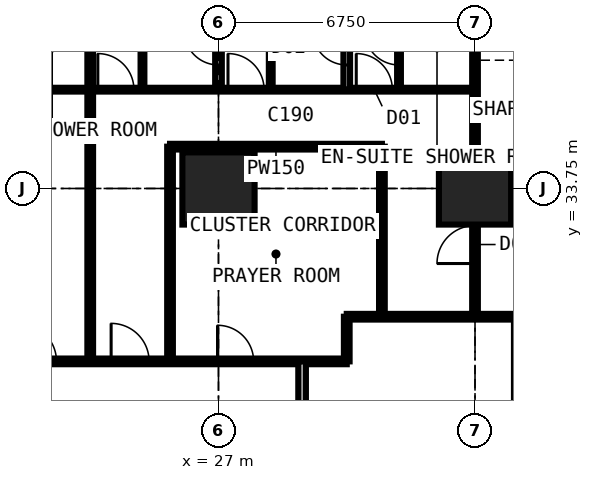
"""IFC4 building model, lengths in metres.
Left out: names, types, materials, properties, quantities, classifications, styles, units other than length and angle.
Written with IfcOpenShell. Run it as: python <this file> out.ifc"""

import sys

from ifc_helpers import new_model, si_unit, direction, frame, frame_2d, origin, origin_2d, place, context, subcontext, project, spatial, rectangle, extrude, element, fill, save


model = new_model("IFC4")
c1 = context("Model", 3, precision=1e-05, world=origin(), true_north=direction((0.0, 1.0)))
c2 = subcontext(c1, "Body", "Model", "MODEL_VIEW")
j1 = project(units=[si_unit("LENGTHUNIT", "METRE"), si_unit("PLANEANGLEUNIT", "RADIAN")], contexts=[c1])
p1 = place(None, origin())
s1 = spatial("IfcSite", under=j1, at=p1, CompositionType="ELEMENT")
p2 = place(p1, origin())
s2 = spatial("IfcBuilding", under=s1, at=p2, CompositionType="ELEMENT")
p3 = place(p2, frame((0.0, 0.0, 32.4)))
s3 = spatial("IfcBuildingStorey", under=s2, at=p3, CompositionType="ELEMENT", Elevation=32.4)
for number, where, z_axis, x_axis in (
    (1, (27.0, 33.75, 0.0), (0.0, 0.0, 1.0), (1.0, 0.0, 0.0)),
    (2, (33.75, 33.75, 0.0), (0.0, 0.0, 1.0), (1.0, 0.0, 0.0)),
):
    element("IfcColumn", number, at=place(p3, frame(where, z_axis=z_axis, x_axis=x_axis)), inside=s3, PredefinedType="COLUMN", context=c2, shape_type="SweptSolid", body=[
        extrude(rectangle(XDim=1.9, YDim=1.9, at=origin_2d()), origin(), (0.0, 0.0, 1.0), 3.6),
    ])
p4 = place(p3, frame((10.125, 36.35, 0.0), z_axis=(0.0, 0.0, 1.0), x_axis=(1.0, 0.0, 0.0)))
e3 = element("IfcWall", 3, at=p4, inside=s3, PredefinedType="PARTITIONING", context=c2, shape_type="SweptSolid", body=[
    extrude(rectangle(XDim=23.625, YDim=0.1, at=frame_2d((11.812, 0.0))), origin(), (0.0, 0.0, 1.0), 3.375),
])
p5 = place(p4, frame((20.5, 0.0, 0.0)))
e4 = element("IfcOpeningElement", 4, at=p5, cuts=e3, PredefinedType="OPENING", context=c2, shape_type="SweptSolid", body=[
    extrude(rectangle(XDim=0.95, YDim=2.2, at=frame_2d((0.475, 1.1))), frame((0.0, 0.06, 0.0), z_axis=(0.0, -1.0, 0.0), x_axis=(1.0, 0.0, 0.0)), (0.0, 0.0, 1.0), 0.12),
])
p6 = place(p4, frame((17.125, 0.0, 0.0)))
e5 = element("IfcOpeningElement", 5, at=p6, cuts=e3, PredefinedType="OPENING", context=c2, shape_type="SweptSolid", body=[
    extrude(rectangle(XDim=0.95, YDim=2.2, at=frame_2d((0.475, 1.1))), frame((0.0, 0.06, 0.0), z_axis=(0.0, -1.0, 0.0), x_axis=(1.0, 0.0, 0.0)), (0.0, 0.0, 1.0), 0.12),
])
p7 = place(p4, frame((13.7, 0.0, 0.0)))
e6 = element("IfcOpeningElement", 6, at=p7, cuts=e3, PredefinedType="OPENING", context=c2, shape_type="SweptSolid", body=[
    extrude(rectangle(XDim=0.95, YDim=2.2, at=frame_2d((0.475, 1.1))), frame((0.0, 0.06, 0.0), z_axis=(0.0, -1.0, 0.0), x_axis=(1.0, 0.0, 0.0)), (0.0, 0.0, 1.0), 0.12),
])
p8 = place(p4, frame((0.2, 0.0, 0.0)))
e7 = element("IfcOpeningElement", 7, at=p8, cuts=e3, PredefinedType="OPENING", context=c2, shape_type="SweptSolid", body=[
    extrude(rectangle(XDim=0.95, YDim=2.2, at=frame_2d((0.475, 1.1))), frame((0.0, 0.06, 0.0), z_axis=(0.0, -1.0, 0.0), x_axis=(1.0, 0.0, 0.0)), (0.0, 0.0, 1.0), 0.12),
])
p9 = place(p4, frame((3.625, 0.0, 0.0)))
e8 = element("IfcOpeningElement", 8, at=p9, cuts=e3, PredefinedType="OPENING", context=c2, shape_type="SweptSolid", body=[
    extrude(rectangle(XDim=0.95, YDim=2.2, at=frame_2d((0.475, 1.1))), frame((0.0, 0.06, 0.0), z_axis=(0.0, -1.0, 0.0), x_axis=(1.0, 0.0, 0.0)), (0.0, 0.0, 1.0), 0.12),
])
p10 = place(p4, frame((7.0, 0.0, 0.0)))
e9 = element("IfcOpeningElement", 9, at=p10, cuts=e3, PredefinedType="OPENING", context=c2, shape_type="SweptSolid", body=[
    extrude(rectangle(XDim=0.95, YDim=2.2, at=frame_2d((0.475, 1.1))), frame((0.0, 0.06, 0.0), z_axis=(0.0, -1.0, 0.0), x_axis=(1.0, 0.0, 0.0)), (0.0, 0.0, 1.0), 0.12),
])
p11 = place(p4, frame((10.375, 0.0, 0.0)))
e10 = element("IfcOpeningElement", 10, at=p11, cuts=e3, PredefinedType="OPENING", context=c2, shape_type="SweptSolid", body=[
    extrude(rectangle(XDim=0.95, YDim=2.2, at=frame_2d((0.475, 1.1))), frame((0.0, 0.06, 0.0), z_axis=(0.0, -1.0, 0.0), x_axis=(1.0, 0.0, 0.0)), (0.0, 0.0, 1.0), 0.12),
])
p12 = place(p3, frame((11.3, 29.2, 0.0), z_axis=(0.0, 0.0, 1.0), x_axis=(1.0, 0.0, 0.0)))
e11 = element("IfcWall", 11, at=p12, inside=s3, PredefinedType="PARTITIONING", context=c2, shape_type="SweptSolid", body=[
    extrude(rectangle(XDim=19.075, YDim=0.15, at=frame_2d((9.538, 0.0))), origin(), (0.0, 0.0, 1.0), 3.375),
])
p13 = place(p12, frame((12.875, 0.0, 0.0)))
e12 = element("IfcOpeningElement", 12, at=p13, cuts=e11, PredefinedType="OPENING", context=c2, shape_type="SweptSolid", body=[
    extrude(rectangle(XDim=1.0, YDim=2.2, at=frame_2d((0.5, 1.1))), frame((0.0, 0.085, 0.0), z_axis=(0.0, -1.0, 0.0), x_axis=(1.0, 0.0, 0.0)), (0.0, 0.0, 1.0), 0.17),
])
p14 = place(p12, frame((10.438, 0.0, 0.0)))
e13 = element("IfcOpeningElement", 13, at=p14, cuts=e11, PredefinedType="OPENING", context=c2, shape_type="SweptSolid", body=[
    extrude(rectangle(XDim=1.0, YDim=2.2, at=frame_2d((0.5, 1.1))), frame((0.0, 0.085, 0.0), z_axis=(0.0, -1.0, 0.0), x_axis=(1.0, 0.0, 0.0)), (0.0, 0.0, 1.0), 0.17),
])
p15 = place(p12, frame((15.675, 0.0, 0.0)))
e14 = element("IfcOpeningElement", 14, at=p15, cuts=e11, PredefinedType="OPENING", context=c2, shape_type="SweptSolid", body=[
    extrude(rectangle(XDim=0.95, YDim=2.2, at=frame_2d((0.475, 1.1))), frame((0.0, 0.085, 0.0), z_axis=(0.0, -1.0, 0.0), x_axis=(1.0, 0.0, 0.0)), (0.0, 0.0, 1.0), 0.17),
])
p16 = place(p3, frame((23.625, 29.2, 0.0), z_axis=(0.0, 0.0, 1.0), x_axis=(0.0, 1.0, 0.0)))
e15 = element("IfcWall", 15, at=p16, inside=s3, PredefinedType="PARTITIONING", context=c2, shape_type="SweptSolid", body=[
    extrude(rectangle(XDim=12.034, YDim=0.15, at=frame_2d((6.017, 0.0))), origin(), (0.0, 0.0, 1.0), 3.375),
])
p17 = place(p3, frame((25.0, 36.35, 0.0), z_axis=(0.0, 0.0, 1.0), x_axis=(0.0, 1.0, 0.0)))
e16 = element("IfcWall", 16, at=p17, inside=s3, PredefinedType="PARTITIONING", context=c2, shape_type="SweptSolid", body=[
    extrude(rectangle(XDim=2.2, YDim=0.1, at=frame_2d((1.1, 0.0))), origin(), (0.0, 0.0, 1.0), 3.375),
])
p18 = place(p3, frame((25.725, 29.2, 0.0), z_axis=(0.0, 0.0, 1.0), x_axis=(0.0, 1.0, 0.0)))
e17 = element("IfcWall", 17, at=p18, inside=s3, PredefinedType="PARTITIONING", context=c2, shape_type="SweptSolid", body=[
    extrude(rectangle(XDim=5.65, YDim=0.15, at=frame_2d((2.825, 0.0))), origin(), (0.0, 0.0, 1.0), 3.375),
])
p19 = place(p3, frame((25.725, 34.85, 0.0), z_axis=(0.0, 0.0, 1.0), x_axis=(1.0, 0.0, 0.0)))
e18 = element("IfcWall", 18, at=p19, inside=s3, PredefinedType="PARTITIONING", context=c2, shape_type="SweptSolid", body=[
    extrude(rectangle(XDim=5.575, YDim=0.15, at=frame_2d((2.788, 0.0))), origin(), (0.0, 0.0, 1.0), 3.375),
])
p20 = place(p3, frame((27.0, 36.35, 0.0), z_axis=(0.0, 0.0, 1.0), x_axis=(0.0, 1.0, 0.0)))
e19 = element("IfcWall", 19, at=p20, inside=s3, PredefinedType="PARTITIONING", context=c2, shape_type="SweptSolid", body=[
    extrude(rectangle(XDim=4.884, YDim=0.175, at=frame_2d((2.442, 0.0))), origin(), (0.0, 0.0, 1.0), 2.61),
])
p21 = place(p20, frame((0.65, 0.0, 0.0)))
e20 = element("IfcOpeningElement", 20, at=p21, cuts=e19, PredefinedType="OPENING", context=c2, shape_type="SweptSolid", body=[
    extrude(rectangle(XDim=0.9, YDim=2.2, at=frame_2d((0.45, 1.1))), frame((0.0, 0.097, 0.0), z_axis=(0.0, -1.0, 0.0), x_axis=(1.0, 0.0, 0.0)), (0.0, 0.0, 1.0), 0.195),
])
p22 = place(p3, frame((28.375, 36.35, 0.0), z_axis=(0.0, 0.0, 1.0), x_axis=(0.0, 1.0, 0.0)))
e21 = element("IfcWall", 21, at=p22, inside=s3, PredefinedType="PARTITIONING", context=c2, shape_type="SweptSolid", body=[
    extrude(rectangle(XDim=2.2, YDim=0.1, at=frame_2d((1.1, 0.0))), origin(), (0.0, 0.0, 1.0), 3.375),
])
p23 = place(p3, frame((29.2, 11.3, 0.0), z_axis=(0.0, 0.0, 1.0), x_axis=(0.0, 1.0, 0.0)))
e22 = element("IfcWall", 22, at=p23, inside=s3, PredefinedType="PARTITIONING", context=c2, shape_type="SweptSolid", body=[
    extrude(rectangle(XDim=17.9, YDim=0.2, at=frame_2d((8.95, 0.0))), origin(), (0.0, 0.0, 1.0), 3.375),
])
p24 = place(p23, frame((8.35, 0.0, 0.0)))
e23 = element("IfcOpeningElement", 23, at=p24, cuts=e22, PredefinedType="OPENING", context=c2, shape_type="SweptSolid", body=[
    extrude(rectangle(XDim=1.2, YDim=2.2, at=frame_2d((0.6, 1.1))), frame((0.0, 0.11, 0.0), z_axis=(0.0, -1.0, 0.0), x_axis=(1.0, 0.0, 0.0)), (0.0, 0.0, 1.0), 0.22),
])
p25 = place(p3, frame((30.375, 29.2, 0.0), z_axis=(0.0, 0.0, 1.0), x_axis=(0.0, 1.0, 0.0)))
e24 = element("IfcWall", 24, at=p25, inside=s3, PredefinedType="PARTITIONING", context=c2, shape_type="SweptSolid", body=[
    extrude(rectangle(XDim=1.175, YDim=0.15, at=frame_2d((0.587, 0.0))), origin(), (0.0, 0.0, 1.0), 3.375),
])
p26 = place(p3, frame((30.375, 30.375, 0.0), z_axis=(0.0, 0.0, 1.0), x_axis=(1.0, 0.0, 0.0)))
e25 = element("IfcWall", 25, at=p26, inside=s3, PredefinedType="PARTITIONING", context=c2, shape_type="SweptSolid", body=[
    extrude(rectangle(XDim=10.859, YDim=0.15, at=frame_2d((5.429, 0.0))), origin(), (0.0, 0.0, 1.0), 3.375),
])
p27 = place(p3, frame((30.375, 36.35, 0.0), z_axis=(0.0, 0.0, 1.0), x_axis=(0.0, 1.0, 0.0)))
e26 = element("IfcWall", 26, at=p27, inside=s3, PredefinedType="PARTITIONING", context=c2, shape_type="SweptSolid", body=[
    extrude(rectangle(XDim=4.884, YDim=0.175, at=frame_2d((2.442, 0.0))), origin(), (0.0, 0.0, 1.0), 3.375),
])
p28 = place(p27, frame((0.65, 0.0, 0.0)))
e27 = element("IfcOpeningElement", 27, at=p28, cuts=e26, PredefinedType="OPENING", context=c2, shape_type="SweptSolid", body=[
    extrude(rectangle(XDim=0.9, YDim=2.2, at=frame_2d((0.45, 1.1))), frame((0.0, 0.097, 0.0), z_axis=(0.0, -1.0, 0.0), x_axis=(1.0, 0.0, 0.0)), (0.0, 0.0, 1.0), 0.195),
])
p29 = place(p3, frame((31.3, 30.375, 0.0), z_axis=(0.0, 0.0, 1.0), x_axis=(0.0, 1.0, 0.0)))
e28 = element("IfcWall", 28, at=p29, inside=s3, PredefinedType="PARTITIONING", context=c2, shape_type="SweptSolid", body=[
    extrude(rectangle(XDim=4.475, YDim=0.15, at=frame_2d((2.238, 0.0))), origin(), (0.0, 0.0, 1.0), 3.375),
])
p30 = place(p3, frame((31.75, 36.35, 0.0), z_axis=(0.0, 0.0, 1.0), x_axis=(0.0, 1.0, 0.0)))
e29 = element("IfcWall", 29, at=p30, inside=s3, PredefinedType="PARTITIONING", context=c2, shape_type="SweptSolid", body=[
    extrude(rectangle(XDim=2.2, YDim=0.1, at=frame_2d((1.1, 0.0))), origin(), (0.0, 0.0, 1.0), 3.375),
])
p31 = place(p30, frame((0.65, 0.0, 0.0)))
e30 = element("IfcOpeningElement", 30, at=p31, cuts=e29, PredefinedType="OPENING", context=c2, shape_type="SweptSolid", body=[
    extrude(rectangle(XDim=0.9, YDim=2.2, at=frame_2d((0.45, 1.1))), frame((0.0, 0.06, 0.0), z_axis=(0.0, -1.0, 0.0), x_axis=(1.0, 0.0, 0.0)), (0.0, 0.0, 1.0), 0.12),
])
p32 = place(p3, frame((33.75, 30.375, 0.0), z_axis=(0.0, 0.0, 1.0), x_axis=(0.0, 1.0, 0.0)))
e31 = element("IfcWall", 31, at=p32, inside=s3, PredefinedType="PARTITIONING", context=c2, shape_type="SweptSolid", body=[
    extrude(rectangle(XDim=10.859, YDim=0.15, at=frame_2d((5.429, 0.0))), origin(), (0.0, 0.0, 1.0), 2.877),
])
p33 = place(p32, frame((1.4, 0.0, 0.0)))
e32 = element("IfcOpeningElement", 32, at=p33, cuts=e31, PredefinedType="OPENING", context=c2, shape_type="SweptSolid", body=[
    extrude(rectangle(XDim=1.0, YDim=2.2, at=frame_2d((0.5, 1.1))), frame((0.0, 0.085, 0.0), z_axis=(0.0, -1.0, 0.0), x_axis=(1.0, 0.0, 0.0)), (0.0, 0.0, 1.0), 0.17),
])
p34 = place(p33, origin())
e33 = element("IfcDoor", 33, at=p34, inside=s3, OperationType="SINGLE_SWING_LEFT", PredefinedType="DOOR", context=c2, shape_type="SweptSolid", body=[
    extrude(rectangle(XDim=1.0, YDim=2.2, at=frame_2d((0.5, 1.1))), frame((0.0, 0.025, 0.0), z_axis=(0.0, -1.0, 0.0), x_axis=(1.0, 0.0, 0.0)), (0.0, 0.0, 1.0), 0.05),
])
fill(e32, e33)
p35 = place(p5, origin())
e34 = element("IfcDoor", 34, at=p35, inside=s3, OperationType="SINGLE_SWING_LEFT", PredefinedType="DOOR", context=c2, shape_type="SweptSolid", body=[
    extrude(rectangle(XDim=0.95, YDim=2.2, at=frame_2d((0.475, 1.1))), frame((0.0, 0.025, 0.0), z_axis=(0.0, -1.0, 0.0), x_axis=(1.0, 0.0, 0.0)), (0.0, 0.0, 1.0), 0.05),
])
fill(e4, e34)
p36 = place(p31, origin())
e35 = element("IfcDoor", 35, at=p36, inside=s3, OperationType="SINGLE_SWING_RIGHT", PredefinedType="DOOR", context=c2, shape_type="SweptSolid", body=[
    extrude(rectangle(XDim=0.9, YDim=2.2, at=frame_2d((0.45, 1.1))), frame((0.0, 0.025, 0.0), z_axis=(0.0, -1.0, 0.0), x_axis=(1.0, 0.0, 0.0)), (0.0, 0.0, 1.0), 0.05),
])
fill(e30, e35)
p37 = place(p6, origin())
e36 = element("IfcDoor", 36, at=p37, inside=s3, OperationType="SINGLE_SWING_LEFT", PredefinedType="DOOR", context=c2, shape_type="SweptSolid", body=[
    extrude(rectangle(XDim=0.95, YDim=2.2, at=frame_2d((0.475, 1.1))), frame((0.0, 0.025, 0.0), z_axis=(0.0, -1.0, 0.0), x_axis=(1.0, 0.0, 0.0)), (0.0, 0.0, 1.0), 0.05),
])
fill(e5, e36)
p38 = place(p28, origin())
e37 = element("IfcDoor", 37, at=p38, inside=s3, OperationType="SINGLE_SWING_RIGHT", PredefinedType="DOOR", context=c2, shape_type="SweptSolid", body=[
    extrude(rectangle(XDim=0.9, YDim=2.2, at=frame_2d((0.45, 1.1))), frame((0.0, 0.025, 0.0), z_axis=(0.0, -1.0, 0.0), x_axis=(1.0, 0.0, 0.0)), (0.0, 0.0, 1.0), 0.05),
])
fill(e27, e37)
p39 = place(p7, origin())
e38 = element("IfcDoor", 38, at=p39, inside=s3, OperationType="SINGLE_SWING_LEFT", PredefinedType="DOOR", context=c2, shape_type="SweptSolid", body=[
    extrude(rectangle(XDim=0.95, YDim=2.2, at=frame_2d((0.475, 1.1))), frame((0.0, 0.025, 0.0), z_axis=(0.0, -1.0, 0.0), x_axis=(1.0, 0.0, 0.0)), (0.0, 0.0, 1.0), 0.05),
])
fill(e6, e38)
p40 = place(p21, origin())
e39 = element("IfcDoor", 39, at=p40, inside=s3, OperationType="SINGLE_SWING_RIGHT", PredefinedType="DOOR", context=c2, shape_type="SweptSolid", body=[
    extrude(rectangle(XDim=0.9, YDim=2.2, at=frame_2d((0.45, 1.1))), frame((0.0, 0.025, 0.0), z_axis=(0.0, -1.0, 0.0), x_axis=(1.0, 0.0, 0.0)), (0.0, 0.0, 1.0), 0.05),
])
fill(e20, e39)
p41 = place(p13, origin())
e40 = element("IfcDoor", 40, at=p41, inside=s3, OperationType="SINGLE_SWING_LEFT", PredefinedType="DOOR", context=c2, shape_type="SweptSolid", body=[
    extrude(rectangle(XDim=1.0, YDim=2.2, at=frame_2d((0.5, 1.1))), frame((0.0, 0.025, 0.0), z_axis=(0.0, -1.0, 0.0), x_axis=(1.0, 0.0, 0.0)), (0.0, 0.0, 1.0), 0.05),
])
fill(e12, e40)
p42 = place(p14, origin())
e41 = element("IfcDoor", 41, at=p42, inside=s3, OperationType="SINGLE_SWING_LEFT", PredefinedType="DOOR", context=c2, shape_type="SweptSolid", body=[
    extrude(rectangle(XDim=1.0, YDim=2.2, at=frame_2d((0.5, 1.1))), frame((0.0, 0.025, 0.0), z_axis=(0.0, -1.0, 0.0), x_axis=(1.0, 0.0, 0.0)), (0.0, 0.0, 1.0), 0.05),
])
fill(e13, e41)
p43 = place(p15, origin())
e42 = element("IfcDoor", 42, at=p43, inside=s3, OperationType="SINGLE_SWING_LEFT", PredefinedType="DOOR", context=c2, shape_type="SweptSolid", body=[
    extrude(rectangle(XDim=0.95, YDim=2.2, at=frame_2d((0.475, 1.1))), frame((0.0, 0.025, 0.0), z_axis=(0.0, -1.0, 0.0), x_axis=(1.0, 0.0, 0.0)), (0.0, 0.0, 1.0), 0.05),
])
fill(e14, e42)
save(model, sys.argv[1])
